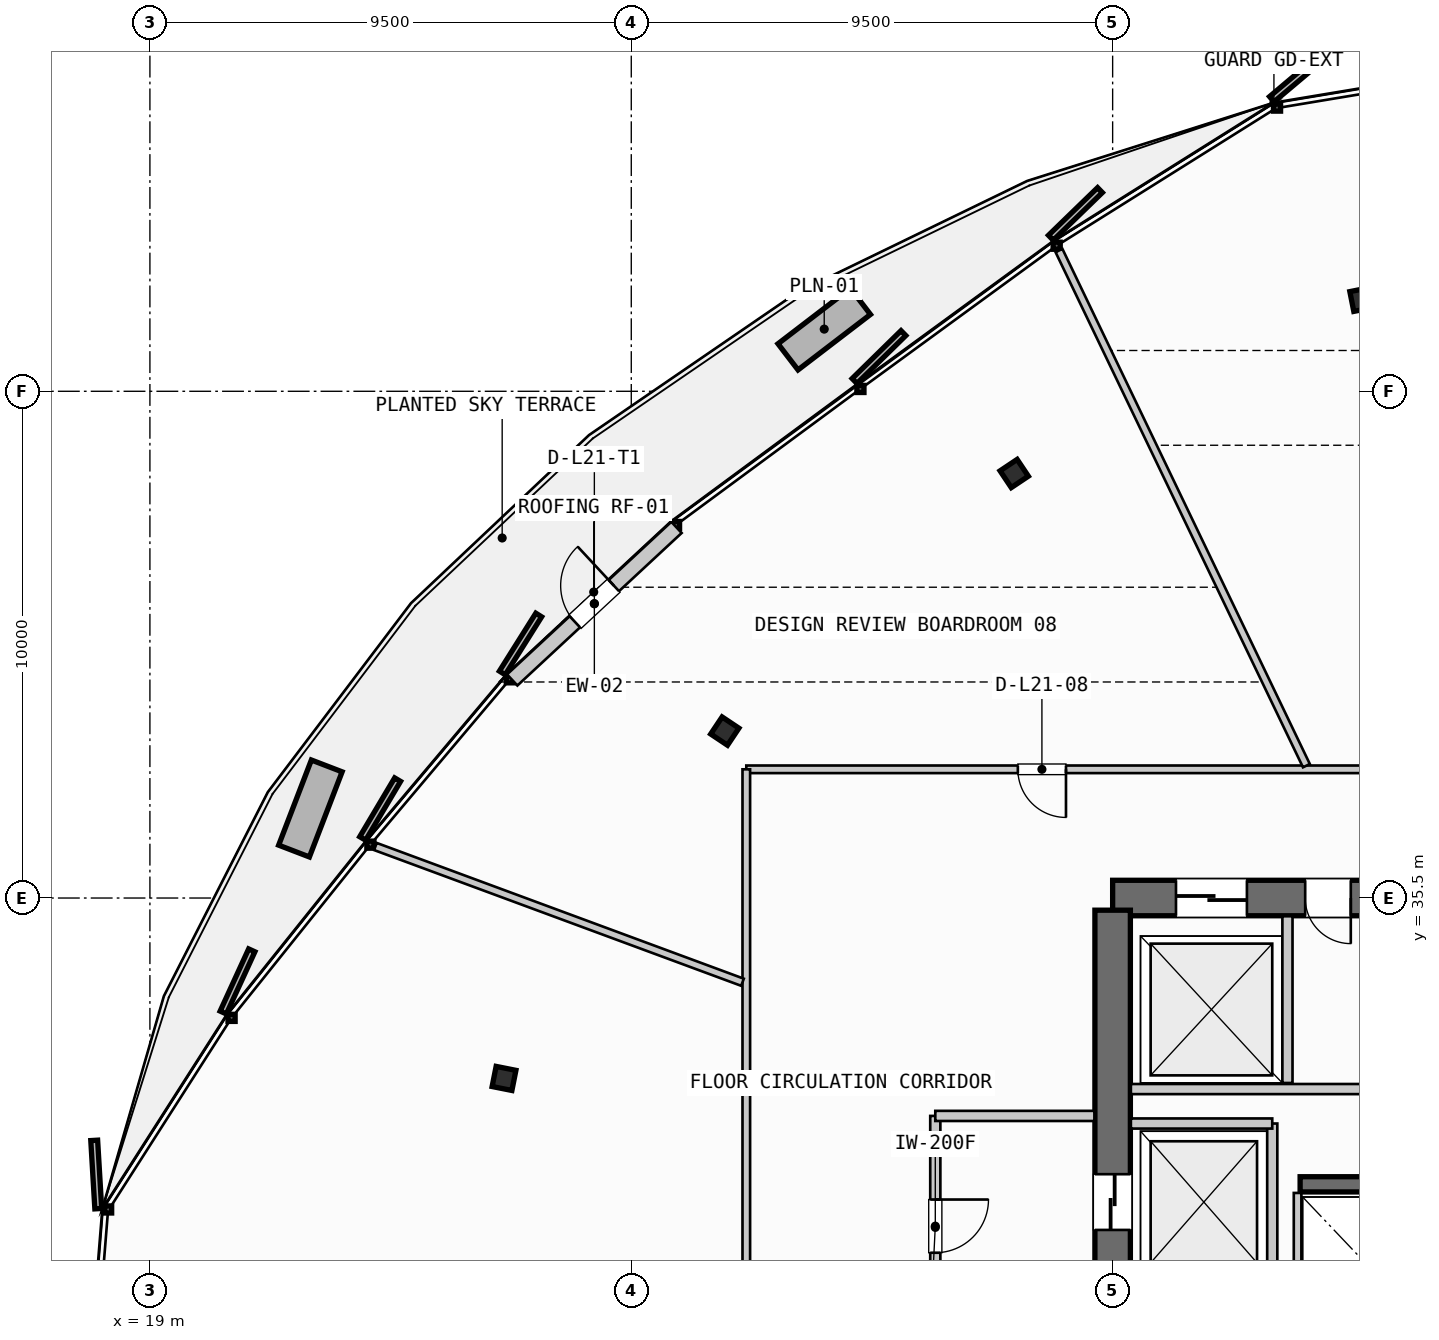
"""IFC4 building model, lengths in metres.
Left out: names, types, materials, properties, quantities, classifications, styles, units other than length and angle.
Written with IfcOpenShell. Run it as: python <this file> out.ifc"""

import sys

from ifc_helpers import new_model, si_unit, direction, frame, frame_2d, origin, origin_2d, place, context, subcontext, project, spatial, rectangle, i_section, extrude, source, transform, mapped, element, fill, save


model = new_model("IFC4")
c1 = context("Model", 3, precision=1e-05, world=origin(), true_north=direction((0.0, 1.0)))
c2 = subcontext(c1, "Body", "Model", "MODEL_VIEW")
j1 = project(units=[si_unit("LENGTHUNIT", "METRE"), si_unit("PLANEANGLEUNIT", "RADIAN")], contexts=[c1])
p1 = place(None, origin())
s1 = spatial("IfcSite", under=j1, at=p1, CompositionType="ELEMENT")
p2 = place(p1, origin())
s2 = spatial("IfcBuilding", under=s1, at=p2, CompositionType="ELEMENT")
p3 = place(p2, frame((0.0, 0.0, 89.2)))
s3 = spatial("IfcBuildingStorey", under=s2, at=p3, CompositionType="ELEMENT", Elevation=89.2)
p4 = place(p3, frame((55.6, 35.5, 0.0), z_axis=(0.0, 0.0, 1.0), x_axis=(-1.0, 0.0, 0.0)))
e1 = element("IfcWall", 1, at=p4, inside=s3, PredefinedType="SHEAR", context=c2, shape_type="SweptSolid", body=[
    extrude(rectangle(XDim=17.6, YDim=0.7, at=frame_2d((8.8, 0.0))), origin(), (0.0, 0.0, 1.0), 3.35),
])
p5 = place(p4, frame((8.05, 0.0, 0.0)))
e2 = element("IfcOpeningElement", 2, at=p5, cuts=e1, PredefinedType="OPENING", context=c2, shape_type="SweptSolid", body=[
    extrude(rectangle(XDim=1.5, YDim=2.2, at=frame_2d((0.75, 1.1))), frame((0.0, 0.36, 0.0), z_axis=(0.0, -1.0, 0.0), x_axis=(1.0, 0.0, 0.0)), (0.0, 0.0, 1.0), 0.72),
])
p6 = place(p4, frame((14.95, 0.0, 0.0)))
e3 = element("IfcOpeningElement", 3, at=p6, cuts=e1, PredefinedType="OPENING", context=c2, shape_type="SweptSolid", body=[
    extrude(rectangle(XDim=1.4, YDim=2.3, at=frame_2d((0.7, 1.15))), frame((0.0, 0.36, 0.0), z_axis=(0.0, -1.0, 0.0), x_axis=(1.0, 0.0, 0.0)), (0.0, 0.0, 1.0), 0.72),
])
p7 = place(p4, frame((12.9, 0.0, 0.0)))
e4 = element("IfcOpeningElement", 4, at=p7, cuts=e1, PredefinedType="OPENING", context=c2, shape_type="SweptSolid", body=[
    extrude(rectangle(XDim=0.9, YDim=2.15, at=frame_2d((0.45, 1.075))), frame((0.0, 0.36, 0.0), z_axis=(0.0, -1.0, 0.0), x_axis=(1.0, 0.0, 0.0)), (0.0, 0.0, 1.0), 0.72),
])
p8 = place(p4, frame((10.6, 0.0, 0.0)))
e5 = element("IfcOpeningElement", 5, at=p8, cuts=e1, PredefinedType="OPENING", context=c2, shape_type="SweptSolid", body=[
    extrude(rectangle(XDim=0.95, YDim=2.15, at=frame_2d((0.475, 1.075))), frame((0.0, 0.36, 0.0), z_axis=(0.0, -1.0, 0.0), x_axis=(1.0, 0.0, 0.0)), (0.0, 0.0, 1.0), 0.72),
])
p9 = place(p3, frame((38.0, 35.26, 0.0), z_axis=(0.0, 0.0, 1.0), x_axis=(0.0, -1.0, 0.0)))
e6 = element("IfcWall", 6, at=p9, inside=s3, PredefinedType="SHEAR", context=c2, shape_type="SweptSolid", body=[
    extrude(rectangle(XDim=14.92, YDim=0.7, at=frame_2d((7.46, 0.0))), origin(), (0.0, 0.0, 1.0), 3.35),
])
p10 = place(p9, frame((5.21, 0.0, 0.0)))
e7 = element("IfcOpeningElement", 7, at=p10, cuts=e6, PredefinedType="OPENING", context=c2, shape_type="SweptSolid", body=[
    extrude(rectangle(XDim=1.1, YDim=2.2, at=frame_2d((0.55, 1.1))), frame((0.0, 0.36, 0.0), z_axis=(0.0, -1.0, 0.0), x_axis=(1.0, 0.0, 0.0)), (0.0, 0.0, 1.0), 0.72),
])
p11 = place(p3, frame((41.7, 29.85, 0.0), z_axis=(0.0, 0.0, 1.0), x_axis=(1.0, 0.0, 0.0)))
e8 = element("IfcWall", 8, at=p11, inside=s3, PredefinedType="SHEAR", context=c2, shape_type="SweptSolid", body=[
    extrude(rectangle(XDim=4.25, YDim=0.3, at=frame_2d((2.125, 0.0))), origin(), (0.0, 0.0, 1.0), 3.35),
])
m1 = source(origin(), c2, "Body", "SweptSolid", [
    extrude(i_section(OverallWidth=0.405, OverallDepth=0.398, WebThickness=0.035, FlangeThickness=0.056, FilletRadius=0.015, at=origin_2d()), origin(), (0.0, 0.0, 1.0), 3.35),
])
for number, where, z_axis, x_axis in (
    (9, (42.919, 47.311, 0.0), (0.0, 0.0, 1.0), (-0.195, 0.981, 0.0)),
    (10, (36.058, 43.877, 0.0), (0.0, 0.0, 1.0), (-0.556, 0.831, 0.0)),
    (11, (30.346, 38.794, 0.0), (0.0, 0.0, 1.0), (-0.831, 0.556, 0.0)),
    (12, (25.989, 31.94, 0.0), (0.0, 0.0, 1.0), (-0.981, 0.195, 0.0)),
):
    element("IfcColumn", number, at=place(p3, frame(where, z_axis=z_axis, x_axis=x_axis)), inside=s3, PredefinedType="COLUMN", context=c2, shape_type="MappedRepresentation", body=[
        mapped(m1, transform((0.0, 0.0, 0.0), scale=1.0)),
    ])
p12 = place(p3, frame((26.15, 39.803, 0.0), z_axis=(0.0, 0.0, 1.0), x_axis=(0.732752217704, 0.680495545503, 0.0)))
e13 = element("IfcWall", 13, at=p12, inside=s3, PredefinedType="SOLIDWALL", context=c2, shape_type="SweptSolid", body=[
    extrude(rectangle(XDim=4.424, YDim=0.3, at=frame_2d((2.212, 0.0))), origin(), (0.0, 0.0, 1.0), 2.775),
])
p13 = place(p12, frame((1.687, 0.0, 0.0)))
e14 = element("IfcOpeningElement", 14, at=p13, cuts=e13, PredefinedType="OPENING", context=c2, shape_type="SweptSolid", body=[
    extrude(rectangle(XDim=1.05, YDim=2.2, at=frame_2d((0.525, 1.1))), frame((0.0, 0.16, 0.0), z_axis=(0.0, -1.0, 0.0), x_axis=(1.0, 0.0, 0.0)), (0.0, 0.0, 1.0), 0.32),
])
p14 = place(p3, frame((41.15, 27.95, 0.0), z_axis=(0.0, 0.0, 1.0), x_axis=(0.0, 1.0, 0.0)))
e15 = element("IfcWall", 15, at=p14, inside=s3, PredefinedType="PARTITIONING", context=c2, shape_type="SweptSolid", body=[
    extrude(rectangle(XDim=3.1, YDim=0.2, at=frame_2d((1.55, 0.0))), origin(), (0.0, 0.0, 1.0), 2.28),
])
p15 = place(p3, frame((38.36, 31.05, 0.0), z_axis=(0.0, 0.0, 1.0), x_axis=(1.0, 0.0, 0.0)))
e16 = element("IfcWall", 16, at=p15, inside=s3, PredefinedType="PARTITIONING", context=c2, shape_type="SweptSolid", body=[
    extrude(rectangle(XDim=2.79, YDim=0.2, at=frame_2d((1.395, 0.0))), origin(), (0.0, 0.0, 1.0), 2.28),
])
p16 = place(p3, frame((34.5, 31.2, 0.0), z_axis=(0.0, 0.0, 1.0), x_axis=(0.0, -1.0, 0.0)))
e17 = element("IfcWall", 17, at=p16, inside=s3, PredefinedType="PARTITIONING", context=c2, shape_type="SweptSolid", body=[
    extrude(rectangle(XDim=4.4, YDim=0.2, at=frame_2d((2.2, 0.0))), origin(), (0.0, 0.0, 1.0), 2.28),
])
p17 = place(p16, frame((1.65, 0.0, 0.0)))
e18 = element("IfcOpeningElement", 18, at=p17, cuts=e17, PredefinedType="OPENING", context=c2, shape_type="SweptSolid", body=[
    extrude(rectangle(XDim=1.05, YDim=2.15, at=frame_2d((0.525, 1.075))), frame((0.0, 0.11, 0.0), z_axis=(0.0, -1.0, 0.0), x_axis=(1.0, 0.0, 0.0)), (0.0, 0.0, 1.0), 0.22),
])
p18 = place(p3, frame((34.5, 31.2, 0.0), z_axis=(0.0, 0.0, 1.0), x_axis=(1.0, 0.0, 0.0)))
e19 = element("IfcWall", 19, at=p18, inside=s3, PredefinedType="PARTITIONING", context=c2, shape_type="SweptSolid", body=[
    extrude(rectangle(XDim=3.14, YDim=0.2, at=frame_2d((1.57, 0.0))), origin(), (0.0, 0.0, 1.0), 2.28),
])
p19 = place(p3, frame((41.65, 27.41, 0.0), z_axis=(0.0, 0.0, 1.0), x_axis=(0.0, 1.0, 0.0)))
e20 = element("IfcWall", 20, at=p19, inside=s3, PredefinedType="PARTITIONING", context=c2, shape_type="SweptSolid", body=[
    extrude(rectangle(XDim=2.27, YDim=0.15, at=frame_2d((1.135, 0.0))), origin(), (0.0, 0.0, 1.0), 2.28),
])
p20 = place(p3, frame((41.45, 31.85, 0.0), z_axis=(0.0, 0.0, 1.0), x_axis=(0.0, 1.0, 0.0)))
e21 = element("IfcWall", 21, at=p20, inside=s3, PredefinedType="PARTITIONING", context=c2, shape_type="SweptSolid", body=[
    extrude(rectangle(XDim=3.29, YDim=0.2, at=frame_2d((1.645, 0.0))), origin(), (0.0, 0.0, 1.0), 2.28),
])
p21 = place(p3, frame((38.36, 31.73, 0.0), z_axis=(0.0, 0.0, 1.0), x_axis=(1.0, 0.0, 0.0)))
e22 = element("IfcWall", 22, at=p21, inside=s3, PredefinedType="PARTITIONING", context=c2, shape_type="SweptSolid", body=[
    extrude(rectangle(XDim=7.44, YDim=0.2, at=frame_2d((3.72, 0.0))), origin(), (0.0, 0.0, 1.0), 2.28),
])
p22 = place(p3, frame((62.31, 38.04, 0.0), z_axis=(0.0, 0.0, 1.0), x_axis=(-1.0, 0.0, 0.0)))
e23 = element("IfcWall", 23, at=p22, inside=s3, PredefinedType="PARTITIONING", context=c2, shape_type="SweptSolid", body=[
    extrude(rectangle(XDim=31.54, YDim=0.15, at=frame_2d((15.77, 0.0))), origin(), (0.0, 0.0, 1.0), 2.28),
])
p23 = place(p22, frame((3.143, 0.0, 0.0)))
e24 = element("IfcOpeningElement", 24, at=p23, cuts=e23, PredefinedType="OPENING", context=c2, shape_type="SweptSolid", body=[
    extrude(rectangle(XDim=0.95, YDim=2.15, at=frame_2d((0.475, 1.075))), frame((0.0, 0.085, 0.0), z_axis=(0.0, -1.0, 0.0), x_axis=(1.0, 0.0, 0.0)), (0.0, 0.0, 1.0), 0.17),
])
p24 = place(p22, frame((12.512, 0.0, 0.0)))
e25 = element("IfcOpeningElement", 25, at=p24, cuts=e23, PredefinedType="OPENING", context=c2, shape_type="SweptSolid", body=[
    extrude(rectangle(XDim=0.95, YDim=2.15, at=frame_2d((0.475, 1.075))), frame((0.0, 0.085, 0.0), z_axis=(0.0, -1.0, 0.0), x_axis=(1.0, 0.0, 0.0)), (0.0, 0.0, 1.0), 0.17),
])
p25 = place(p22, frame((25.231, 0.0, 0.0)))
e26 = element("IfcOpeningElement", 26, at=p25, cuts=e23, PredefinedType="OPENING", context=c2, shape_type="SweptSolid", body=[
    extrude(rectangle(XDim=0.95, YDim=2.15, at=frame_2d((0.475, 1.075))), frame((0.0, 0.085, 0.0), z_axis=(0.0, -1.0, 0.0), x_axis=(1.0, 0.0, 0.0)), (0.0, 0.0, 1.0), 0.17),
])
p26 = place(p3, frame((30.77, 38.04, 0.0), z_axis=(0.0, 0.0, 1.0), x_axis=(0.0, -1.0, 0.0)))
e27 = element("IfcWall", 27, at=p26, inside=s3, PredefinedType="PARTITIONING", context=c2, shape_type="SweptSolid", body=[
    extrude(rectangle(XDim=20.06, YDim=0.15, at=frame_2d((10.03, 0.0))), origin(), (0.0, 0.0, 1.0), 2.28),
])
p27 = place(p26, frame((11.37, 0.0, 0.0)))
e28 = element("IfcOpeningElement", 28, at=p27, cuts=e27, PredefinedType="OPENING", context=c2, shape_type="SweptSolid", body=[
    extrude(rectangle(XDim=0.95, YDim=2.15, at=frame_2d((0.475, 1.075))), frame((0.0, 0.085, 0.0), z_axis=(0.0, -1.0, 0.0), x_axis=(1.0, 0.0, 0.0)), (0.0, 0.0, 1.0), 0.17),
])
p28 = place(p3, frame((41.824, 38.112, 0.0), z_axis=(0.0, 0.0, 1.0), x_axis=(-0.432973848558, 0.901406482373, 0.0)))
e29 = element("IfcWall", 29, at=p28, inside=s3, PredefinedType="PARTITIONING", context=c2, shape_type="SweptSolid", body=[
    extrude(rectangle(XDim=11.278, YDim=0.15, at=frame_2d((5.639, 0.0))), origin(), (0.0, 0.0, 1.0), 2.28),
])
p29 = place(p3, frame((30.695, 33.838, 0.0), z_axis=(0.0, 0.0, 1.0), x_axis=(-0.937935058172, 0.346810937907, 0.0)))
e30 = element("IfcWall", 30, at=p29, inside=s3, PredefinedType="PARTITIONING", context=c2, shape_type="SweptSolid", body=[
    extrude(rectangle(XDim=7.725, YDim=0.15, at=frame_2d((3.862, 0.0))), origin(), (0.0, 0.0, 1.0), 2.28),
])
m2 = source(origin(), c2, "Body", "SweptSolid", [
    extrude(rectangle(XDim=1.05, YDim=2.2, at=frame_2d((0.525, 1.1))), frame((0.0, 0.025, 0.0), z_axis=(0.0, -1.0, 0.0), x_axis=(1.0, 0.0, 0.0)), (0.0, 0.0, 1.0), 0.05),
])
p30 = place(p13, origin())
e31 = element("IfcDoor", 31, at=p30, inside=s3, OperationType="SINGLE_SWING_RIGHT", PredefinedType="DOOR", context=c2, shape_type="MappedRepresentation", body=[
    mapped(m2, transform((0.0, 0.0, 0.0), scale=1.0)),
])
fill(e14, e31)
m3 = source(origin(), c2, "Body", "SweptSolid", [
    extrude(rectangle(XDim=1.1, YDim=2.2, at=frame_2d((0.55, 1.1))), frame((0.0, 0.025, 0.0), z_axis=(0.0, -1.0, 0.0), x_axis=(1.0, 0.0, 0.0)), (0.0, 0.0, 1.0), 0.05),
])
p31 = place(p10, origin())
e32 = element("IfcDoor", 32, at=p31, inside=s3, OperationType="SLIDING_TO_LEFT", PredefinedType="DOOR", context=c2, shape_type="MappedRepresentation", body=[
    mapped(m3, transform((0.0, 0.0, 0.0), scale=1.0)),
])
fill(e7, e32)
m4 = source(origin(), c2, "Body", "SweptSolid", [
    extrude(rectangle(XDim=1.4, YDim=2.3, at=frame_2d((0.7, 1.15))), frame((0.0, 0.025, 0.0), z_axis=(0.0, -1.0, 0.0), x_axis=(1.0, 0.0, 0.0)), (0.0, 0.0, 1.0), 0.05),
])
p32 = place(p6, origin())
e33 = element("IfcDoor", 33, at=p32, inside=s3, OperationType="SLIDING_TO_RIGHT", PredefinedType="DOOR", context=c2, shape_type="MappedRepresentation", body=[
    mapped(m4, transform((0.0, 0.0, 0.0), scale=1.0)),
])
fill(e3, e33)
m5 = source(origin(), c2, "Body", "SweptSolid", [
    extrude(rectangle(XDim=0.9, YDim=2.15, at=frame_2d((0.45, 1.075))), frame((0.0, 0.025, 0.0), z_axis=(0.0, -1.0, 0.0), x_axis=(1.0, 0.0, 0.0)), (0.0, 0.0, 1.0), 0.05),
])
p33 = place(p7, origin())
e34 = element("IfcDoor", 34, at=p33, inside=s3, OperationType="SINGLE_SWING_LEFT", PredefinedType="DOOR", context=c2, shape_type="MappedRepresentation", body=[
    mapped(m5, transform((0.0, 0.0, 0.0), scale=1.0)),
])
fill(e4, e34)
m6 = source(origin(), c2, "Body", "SweptSolid", [
    extrude(rectangle(XDim=1.05, YDim=2.15, at=frame_2d((0.525, 1.075))), frame((0.0, 0.025, 0.0), z_axis=(0.0, -1.0, 0.0), x_axis=(1.0, 0.0, 0.0)), (0.0, 0.0, 1.0), 0.05),
])
p34 = place(p17, origin())
e35 = element("IfcDoor", 35, at=p34, inside=s3, OperationType="SINGLE_SWING_LEFT", PredefinedType="DOOR", context=c2, shape_type="MappedRepresentation", body=[
    mapped(m6, transform((0.0, 0.0, 0.0), scale=1.0)),
])
fill(e18, e35)
m7 = source(origin(), c2, "Body", "SweptSolid", [
    extrude(rectangle(XDim=0.95, YDim=2.15, at=frame_2d((0.475, 1.075))), frame((0.0, 0.025, 0.0), z_axis=(0.0, -1.0, 0.0), x_axis=(1.0, 0.0, 0.0)), (0.0, 0.0, 1.0), 0.05),
])
p35 = place(p25, origin())
e36 = element("IfcDoor", 36, at=p35, inside=s3, OperationType="SINGLE_SWING_LEFT", PredefinedType="DOOR", context=c2, shape_type="MappedRepresentation", body=[
    mapped(m7, transform((0.0, 0.0, 0.0), scale=1.0)),
])
fill(e26, e36)
save(model, sys.argv[1])
